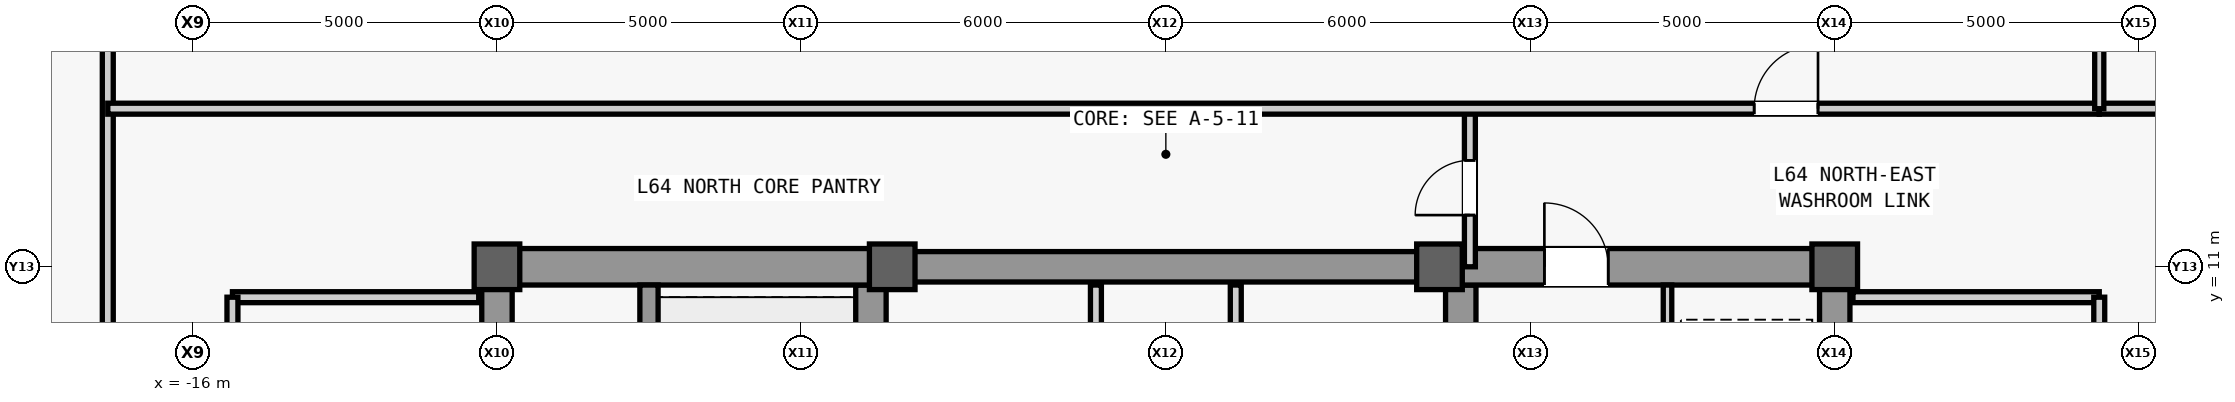
"""IFC4 building model, lengths in metres.
Left out: names, types, materials, properties, quantities, classifications, styles, units other than length and angle.
Written with IfcOpenShell. Run it as: python <this file> out.ifc"""

import sys

from ifc_helpers import new_model, si_unit, direction, frame, frame_2d, origin, origin_2d, place, context, subcontext, project, spatial, rectangle, extrude, source, transform, mapped, element, fill, save


model = new_model("IFC4")
c1 = context("Model", 3, precision=1e-05, world=origin(), true_north=direction((0.0, 1.0)))
c2 = subcontext(c1, "Body", "Model", "MODEL_VIEW")
j1 = project(units=[si_unit("LENGTHUNIT", "METRE"), si_unit("PLANEANGLEUNIT", "RADIAN")], contexts=[c1])
p1 = place(None, origin())
s1 = spatial("IfcSite", under=j1, at=p1, CompositionType="ELEMENT")
p2 = place(p1, origin())
s2 = spatial("IfcBuilding", under=s1, at=p2, CompositionType="ELEMENT")
p3 = place(p2, frame((0.0, 0.0, 273.5)))
s3 = spatial("IfcBuildingStorey", under=s2, at=p3, CompositionType="ELEMENT", Elevation=273.5)
m1 = source(origin(), c2, "Body", "SweptSolid", [
    extrude(rectangle(XDim=22.0, YDim=0.5, at=frame_2d((11.0, 0.0))), origin(), (0.0, 0.0, 1.0), 3.78),
])
p4 = place(p3, frame((-11.0, -11.0, 0.0), z_axis=(0.0, 0.0, 1.0), x_axis=(0.0, 1.0, 0.0)))
e1 = element("IfcWall", 1, at=p4, inside=s3, PredefinedType="SHEAR", context=c2, shape_type="MappedRepresentation", body=[
    mapped(m1, transform((0.0, 0.0, 0.0), scale=1.0)),
])
m2 = source(origin(), c2, "Body", "SweptSolid", [
    extrude(rectangle(XDim=1.1, YDim=2.2, at=frame_2d((0.55, 1.1))), frame((0.0, 0.26, 0.0), z_axis=(0.0, -1.0, 0.0), x_axis=(1.0, 0.0, 0.0)), (0.0, 0.0, 1.0), 0.52),
])
p5 = place(p4, frame((0.8, 0.0, 0.0)))
e2 = element("IfcOpeningElement", 2, at=p5, cuts=e1, PredefinedType="OPENING", context=c2, shape_type="MappedRepresentation", body=[
    mapped(m2, transform((0.0, 0.0, 0.0), scale=1.0)),
])
p6 = place(p4, frame((12.5, 0.0, 0.0)))
e3 = element("IfcOpeningElement", 3, at=p6, cuts=e1, PredefinedType="OPENING", context=c2, shape_type="MappedRepresentation", body=[
    mapped(m2, transform((0.0, 0.0, 0.0), scale=1.0)),
])
m3 = source(origin(), c2, "Body", "SweptSolid", [
    extrude(rectangle(XDim=0.9, YDim=2.15, at=frame_2d((0.45, 1.075))), frame((0.0, 0.26, 0.0), z_axis=(0.0, -1.0, 0.0), x_axis=(1.0, 0.0, 0.0)), (0.0, 0.0, 1.0), 0.52),
])
p7 = place(p4, frame((6.2, 0.0, 0.0)))
e4 = element("IfcOpeningElement", 4, at=p7, cuts=e1, PredefinedType="OPENING", context=c2, shape_type="MappedRepresentation", body=[
    mapped(m3, transform((0.0, 0.0, 0.0), scale=1.0)),
])
p8 = place(p4, frame((8.05, 0.0, 0.0)))
e5 = element("IfcOpeningElement", 5, at=p8, cuts=e1, PredefinedType="OPENING", context=c2, shape_type="MappedRepresentation", body=[
    mapped(m3, transform((0.0, 0.0, 0.0), scale=1.0)),
])
m4 = source(origin(), c2, "Body", "SweptSolid", [
    extrude(rectangle(XDim=1.2, YDim=2.3, at=frame_2d((0.6, 1.15))), frame((0.0, 0.26, 0.0), z_axis=(0.0, -1.0, 0.0), x_axis=(1.0, 0.0, 0.0)), (0.0, 0.0, 1.0), 0.52),
])
p9 = place(p4, frame((14.6, 0.0, 0.0)))
e6 = element("IfcOpeningElement", 6, at=p9, cuts=e1, PredefinedType="OPENING", context=c2, shape_type="MappedRepresentation", body=[
    mapped(m4, transform((0.0, 0.0, 0.0), scale=1.0)),
])
p10 = place(p4, frame((18.2, 0.0, 0.0)))
e7 = element("IfcOpeningElement", 7, at=p10, cuts=e1, PredefinedType="OPENING", context=c2, shape_type="MappedRepresentation", body=[
    mapped(m4, transform((0.0, 0.0, 0.0), scale=1.0)),
])
m5 = source(origin(), c2, "Body", "SweptSolid", [
    extrude(rectangle(XDim=1.3, YDim=2.3, at=frame_2d((0.65, 1.15))), frame((0.0, 0.26, 0.0), z_axis=(0.0, -1.0, 0.0), x_axis=(1.0, 0.0, 0.0)), (0.0, 0.0, 1.0), 0.52),
])
p11 = place(p4, frame((2.7, 0.0, 0.0)))
e8 = element("IfcOpeningElement", 8, at=p11, cuts=e1, PredefinedType="OPENING", context=c2, shape_type="MappedRepresentation", body=[
    mapped(m5, transform((0.0, 0.0, 0.0), scale=1.0)),
])
p12 = place(p3, frame((11.0, -11.0, 0.0), z_axis=(0.0, 0.0, 1.0), x_axis=(0.0, 1.0, 0.0)))
e9 = element("IfcWall", 9, at=p12, inside=s3, PredefinedType="SHEAR", context=c2, shape_type="MappedRepresentation", body=[
    mapped(m1, transform((0.0, 0.0, 0.0), scale=1.0)),
])
p13 = place(p12, frame((0.8, 0.0, 0.0)))
e10 = element("IfcOpeningElement", 10, at=p13, cuts=e9, PredefinedType="OPENING", context=c2, shape_type="MappedRepresentation", body=[
    mapped(m2, transform((0.0, 0.0, 0.0), scale=1.0)),
])
p14 = place(p12, frame((6.85, 0.0, 0.0)))
e11 = element("IfcOpeningElement", 11, at=p14, cuts=e9, PredefinedType="OPENING", context=c2, shape_type="MappedRepresentation", body=[
    mapped(m3, transform((0.0, 0.0, 0.0), scale=1.0)),
])
p15 = place(p12, frame((17.6, 0.0, 0.0)))
e12 = element("IfcOpeningElement", 12, at=p15, cuts=e9, PredefinedType="OPENING", context=c2, shape_type="MappedRepresentation", body=[
    mapped(m4, transform((0.0, 0.0, 0.0), scale=1.0)),
])
p16 = place(p12, frame((19.6, 0.0, 0.0)))
e13 = element("IfcOpeningElement", 13, at=p16, cuts=e9, PredefinedType="OPENING", context=c2, shape_type="MappedRepresentation", body=[
    mapped(m4, transform((0.0, 0.0, 0.0), scale=1.0)),
])
p17 = place(p12, frame((2.7, 0.0, 0.0)))
e14 = element("IfcOpeningElement", 14, at=p17, cuts=e9, PredefinedType="OPENING", context=c2, shape_type="MappedRepresentation", body=[
    mapped(m5, transform((0.0, 0.0, 0.0), scale=1.0)),
])
p18 = place(p12, frame((13.35, 0.0, 0.0)))
e15 = element("IfcOpeningElement", 15, at=p18, cuts=e9, PredefinedType="OPENING", context=c2, shape_type="MappedRepresentation", body=[
    mapped(m5, transform((0.0, 0.0, 0.0), scale=1.0)),
])
m6 = source(origin(), c2, "Body", "SweptSolid", [
    extrude(rectangle(XDim=21.4, YDim=0.5, at=frame_2d((10.7, 0.0))), origin(), (0.0, 0.0, 1.0), 3.78),
])
for number, where, z_axis, x_axis in (
    (16, (-4.85, -10.7, 0.0), (0.0, 0.0, 1.0), (0.0, 1.0, 0.0)),
    (17, (4.85, -10.7, 0.0), (0.0, 0.0, 1.0), (0.0, 1.0, 0.0)),
):
    element("IfcWall", number, at=place(p3, frame(where, z_axis=z_axis, x_axis=x_axis)), inside=s3, PredefinedType="SHEAR", context=c2, shape_type="MappedRepresentation", body=[
        mapped(m6, transform((0.0, 0.0, 0.0), scale=1.0)),
    ])
m7 = source(origin(), c2, "Body", "SweptSolid", [
    extrude(rectangle(XDim=5.9, YDim=0.6, at=frame_2d((2.95, 0.0))), origin(), (0.0, 0.0, 1.0), 3.78),
])
p19 = place(p3, frame((-10.75, 11.0, 0.0), z_axis=(0.0, 0.0, 1.0), x_axis=(1.0, 0.0, 0.0)))
e18 = element("IfcWall", 18, at=p19, inside=s3, PredefinedType="SHEAR", context=c2, shape_type="MappedRepresentation", body=[
    mapped(m7, transform((0.0, 0.0, 0.0), scale=1.0)),
])
p20 = place(p3, frame((4.85, 11.0, 0.0), z_axis=(0.0, 0.0, 1.0), x_axis=(1.0, 0.0, 0.0)))
e19 = element("IfcWall", 19, at=p20, inside=s3, PredefinedType="SHEAR", context=c2, shape_type="MappedRepresentation", body=[
    mapped(m7, transform((0.0, 0.0, 0.0), scale=1.0)),
])
m8 = source(origin(), c2, "Body", "SweptSolid", [
    extrude(rectangle(XDim=1.05, YDim=2.2, at=frame_2d((0.525, 1.1))), frame((0.0, 0.31, 0.0), z_axis=(0.0, -1.0, 0.0), x_axis=(1.0, 0.0, 0.0)), (0.0, 0.0, 1.0), 0.62),
])
p21 = place(p20, frame((1.375, 0.0, 0.0)))
e20 = element("IfcOpeningElement", 20, at=p21, cuts=e19, PredefinedType="OPENING", context=c2, shape_type="MappedRepresentation", body=[
    mapped(m8, transform((0.0, 0.0, 0.0), scale=1.0)),
])
m9 = source(origin(), c2, "Body", "SweptSolid", [
    extrude(rectangle(XDim=9.2, YDim=0.5, at=frame_2d((4.6, 0.0))), origin(), (0.0, 0.0, 1.0), 3.78),
])
p22 = place(p3, frame((-4.6, 11.0, 0.0), z_axis=(0.0, 0.0, 1.0), x_axis=(1.0, 0.0, 0.0)))
e21 = element("IfcWall", 21, at=p22, inside=s3, PredefinedType="SHEAR", context=c2, shape_type="MappedRepresentation", body=[
    mapped(m9, transform((0.0, 0.0, 0.0), scale=1.0)),
])
m10 = source(origin(), c2, "Body", "SweptSolid", [
    extrude(rectangle(XDim=0.75, YDim=0.75, at=origin_2d()), origin(), (0.0, 0.0, 1.0), 4.0),
])
for number, where, z_axis, x_axis in (
    (22, (-11.0, 11.0, 0.0), (0.0, 0.0, 1.0), (1.0, 0.0, 0.0)),
    (23, (-4.5, 11.0, 0.0), (0.0, 0.0, 1.0), (1.0, 0.0, 0.0)),
    (24, (4.5, 11.0, 0.0), (0.0, 0.0, 1.0), (1.0, 0.0, 0.0)),
    (25, (11.0, 11.0, 0.0), (0.0, 0.0, 1.0), (1.0, 0.0, 0.0)),
):
    element("IfcColumn", number, at=place(p3, frame(where, z_axis=z_axis, x_axis=x_axis)), inside=s3, PredefinedType="COLUMN", context=c2, shape_type="MappedRepresentation", body=[
        mapped(m10, transform((0.0, 0.0, 0.0), scale=1.0)),
    ])
m11 = source(origin(), c2, "Body", "SweptSolid", [
    extrude(rectangle(XDim=7.75, YDim=0.3, at=frame_2d((3.875, 0.0))), origin(), (0.0, 0.0, 1.0), 3.78),
])
p23 = place(p3, frame((-8.5, 2.95, 0.0), z_axis=(0.0, 0.0, 1.0), x_axis=(0.0, 1.0, 0.0)))
e26 = element("IfcWall", 26, at=p23, inside=s3, PredefinedType="SHEAR", context=c2, shape_type="MappedRepresentation", body=[
    mapped(m11, transform((0.0, 0.0, 0.0), scale=1.0)),
])
m12 = source(origin(), c2, "Body", "SweptSolid", [
    extrude(rectangle(XDim=9.4, YDim=0.14, at=frame_2d((4.7, 0.0))), origin(), (0.0, 0.0, 1.0), 3.78),
])
p24 = place(p3, frame((8.25, 1.3, 0.0), z_axis=(0.0, 0.0, 1.0), x_axis=(0.0, 1.0, 0.0)))
e27 = element("IfcWall", 27, at=p24, inside=s3, PredefinedType="PARTITIONING", context=c2, shape_type="MappedRepresentation", body=[
    mapped(m12, transform((0.0, 0.0, 0.0), scale=1.0)),
])
m13 = source(origin(), c2, "Body", "SweptSolid", [
    extrude(rectangle(XDim=4.05, YDim=0.18, at=frame_2d((2.025, 0.0))), origin(), (0.0, 0.0, 1.0), 3.78),
])
p25 = place(p3, frame((-15.35, 10.5, 0.0), z_axis=(0.0, 0.0, 1.0), x_axis=(1.0, 0.0, 0.0)))
e28 = element("IfcWall", 28, at=p25, inside=s3, PredefinedType="PARTITIONING", context=c2, shape_type="MappedRepresentation", body=[
    mapped(m13, transform((0.0, 0.0, 0.0), scale=1.0)),
])
m14 = source(origin(), c2, "Body", "SweptSolid", [
    extrude(rectangle(XDim=16.6, YDim=0.18, at=frame_2d((8.3, 0.0))), origin(), (0.0, 0.0, 1.0), 3.78),
])
p26 = place(p3, frame((-15.35, -6.1, 0.0), z_axis=(0.0, 0.0, 1.0), x_axis=(0.0, 1.0, 0.0)))
e29 = element("IfcWall", 29, at=p26, inside=s3, PredefinedType="PARTITIONING", context=c2, shape_type="MappedRepresentation", body=[
    mapped(m14, transform((0.0, 0.0, 0.0), scale=1.0)),
])
m15 = source(origin(), c2, "Body", "SweptSolid", [
    extrude(rectangle(XDim=1.8, YDim=2.25, at=frame_2d((0.9, 1.125))), frame((0.0, 0.1, 0.0), z_axis=(0.0, -1.0, 0.0), x_axis=(1.0, 0.0, 0.0)), (0.0, 0.0, 1.0), 0.2),
])
p27 = place(p26, frame((2.7, 0.0, 0.0)))
e30 = element("IfcOpeningElement", 30, at=p27, cuts=e29, PredefinedType="OPENING", context=c2, shape_type="MappedRepresentation", body=[
    mapped(m15, transform((0.0, 0.0, 0.0), scale=1.0)),
])
p28 = place(p26, frame((11.0, 0.0, 0.0)))
e31 = element("IfcOpeningElement", 31, at=p28, cuts=e29, PredefinedType="OPENING", context=c2, shape_type="MappedRepresentation", body=[
    mapped(m15, transform((0.0, 0.0, 0.0), scale=1.0)),
])
p29 = place(p3, frame((11.3, 10.5, 0.0), z_axis=(0.0, 0.0, 1.0), x_axis=(1.0, 0.0, 0.0)))
e32 = element("IfcWall", 32, at=p29, inside=s3, PredefinedType="PARTITIONING", context=c2, shape_type="MappedRepresentation", body=[
    mapped(m13, transform((0.0, 0.0, 0.0), scale=1.0)),
])
p30 = place(p3, frame((15.35, -6.1, 0.0), z_axis=(0.0, 0.0, 1.0), x_axis=(0.0, 1.0, 0.0)))
e33 = element("IfcWall", 33, at=p30, inside=s3, PredefinedType="PARTITIONING", context=c2, shape_type="MappedRepresentation", body=[
    mapped(m14, transform((0.0, 0.0, 0.0), scale=1.0)),
])
p31 = place(p30, frame((2.7, 0.0, 0.0)))
e34 = element("IfcOpeningElement", 34, at=p31, cuts=e33, PredefinedType="OPENING", context=c2, shape_type="MappedRepresentation", body=[
    mapped(m15, transform((0.0, 0.0, 0.0), scale=1.0)),
])
p32 = place(p30, frame((13.0, 0.0, 0.0)))
e35 = element("IfcOpeningElement", 35, at=p32, cuts=e33, PredefinedType="OPENING", context=c2, shape_type="MappedRepresentation", body=[
    mapped(m15, transform((0.0, 0.0, 0.0), scale=1.0)),
])
m16 = source(origin(), c2, "Body", "SweptSolid", [
    extrude(rectangle(XDim=5.4, YDim=0.18, at=frame_2d((2.7, 0.0))), origin(), (0.0, 0.0, 1.0), 3.78),
])
p33 = place(p3, frame((-1.15, 5.3, 0.0), z_axis=(0.0, 0.0, 1.0), x_axis=(0.0, 1.0, 0.0)))
e36 = element("IfcWall", 36, at=p33, inside=s3, PredefinedType="PARTITIONING", context=c2, shape_type="MappedRepresentation", body=[
    mapped(m16, transform((0.0, 0.0, 0.0), scale=1.0)),
])
m17 = source(origin(), c2, "Body", "SweptSolid", [
    extrude(rectangle(XDim=0.9, YDim=2.15, at=frame_2d((0.45, 1.075))), frame((0.0, 0.1, 0.0), z_axis=(0.0, -1.0, 0.0), x_axis=(1.0, 0.0, 0.0)), (0.0, 0.0, 1.0), 0.2),
])
p34 = place(p33, frame((0.9, 0.0, 0.0)))
e37 = element("IfcOpeningElement", 37, at=p34, cuts=e36, PredefinedType="OPENING", context=c2, shape_type="MappedRepresentation", body=[
    mapped(m17, transform((0.0, 0.0, 0.0), scale=1.0)),
])
p35 = place(p33, frame((3.6, 0.0, 0.0)))
e38 = element("IfcOpeningElement", 38, at=p35, cuts=e36, PredefinedType="OPENING", context=c2, shape_type="MappedRepresentation", body=[
    mapped(m17, transform((0.0, 0.0, 0.0), scale=1.0)),
])
p36 = place(p3, frame((1.15, 5.3, 0.0), z_axis=(0.0, 0.0, 1.0), x_axis=(0.0, 1.0, 0.0)))
e39 = element("IfcWall", 39, at=p36, inside=s3, PredefinedType="PARTITIONING", context=c2, shape_type="MappedRepresentation", body=[
    mapped(m16, transform((0.0, 0.0, 0.0), scale=1.0)),
])
p37 = place(p36, frame((2.25, 0.0, 0.0)))
e40 = element("IfcOpeningElement", 40, at=p37, cuts=e39, PredefinedType="OPENING", context=c2, shape_type="MappedRepresentation", body=[
    mapped(m17, transform((0.0, 0.0, 0.0), scale=1.0)),
])
m18 = source(origin(), c2, "Body", "SweptSolid", [
    extrude(rectangle(XDim=8.4, YDim=0.18, at=frame_2d((4.2, 0.0))), origin(), (0.0, 0.0, 1.0), 3.78),
])
p38 = place(p3, frame((-17.4, 7.2, 0.0), z_axis=(0.0, 0.0, 1.0), x_axis=(0.0, 1.0, 0.0)))
e41 = element("IfcWall", 41, at=p38, inside=s3, PredefinedType="PARTITIONING", context=c2, shape_type="MappedRepresentation", body=[
    mapped(m18, transform((0.0, 0.0, 0.0), scale=1.0)),
])
m19 = source(origin(), c2, "Body", "SweptSolid", [
    extrude(rectangle(XDim=2.6, YDim=0.18, at=frame_2d((1.3, 0.0))), origin(), (0.0, 0.0, 1.0), 3.78),
])
p39 = place(p3, frame((5.0, 11.0, 0.0), z_axis=(0.0, 0.0, 1.0), x_axis=(0.0, 1.0, 0.0)))
e42 = element("IfcWall", 42, at=p39, inside=s3, PredefinedType="PARTITIONING", context=c2, shape_type="MappedRepresentation", body=[
    mapped(m19, transform((0.0, 0.0, 0.0), scale=1.0)),
])
p40 = place(p39, frame((0.85, 0.0, 0.0)))
e43 = element("IfcOpeningElement", 43, at=p40, cuts=e42, PredefinedType="OPENING", context=c2, shape_type="MappedRepresentation", body=[
    mapped(m17, transform((0.0, 0.0, 0.0), scale=1.0)),
])
m20 = source(origin(), c2, "Body", "SweptSolid", [
    extrude(rectangle(XDim=2.4, YDim=0.18, at=frame_2d((1.2, 0.0))), origin(), (0.0, 0.0, 1.0), 3.78),
])
p41 = place(p3, frame((15.35, 13.6, 0.0), z_axis=(0.0, 0.0, 1.0), x_axis=(1.0, 0.0, 0.0)))
e44 = element("IfcWall", 44, at=p41, inside=s3, PredefinedType="PARTITIONING", context=c2, shape_type="MappedRepresentation", body=[
    mapped(m20, transform((0.0, 0.0, 0.0), scale=1.0)),
])
m21 = source(origin(), c2, "Body", "SweptSolid", [
    extrude(rectangle(XDim=32.75, YDim=0.18, at=frame_2d((16.375, 0.0))), origin(), (0.0, 0.0, 1.0), 3.78),
])
p42 = place(p3, frame((-17.4, 13.6, 0.0), z_axis=(0.0, 0.0, 1.0), x_axis=(1.0, 0.0, 0.0)))
e45 = element("IfcWall", 45, at=p42, inside=s3, PredefinedType="PARTITIONING", context=c2, shape_type="MappedRepresentation", body=[
    mapped(m21, transform((0.0, 0.0, 0.0), scale=1.0)),
])
m22 = source(origin(), c2, "Body", "SweptSolid", [
    extrude(rectangle(XDim=1.05, YDim=2.2, at=frame_2d((0.525, 1.1))), frame((0.0, 0.1, 0.0), z_axis=(0.0, -1.0, 0.0), x_axis=(1.0, 0.0, 0.0)), (0.0, 0.0, 1.0), 0.2),
])
p43 = place(p42, frame((27.075, 0.0, 0.0)))
e46 = element("IfcOpeningElement", 46, at=p43, cuts=e45, PredefinedType="OPENING", context=c2, shape_type="MappedRepresentation", body=[
    mapped(m22, transform((0.0, 0.0, 0.0), scale=1.0)),
])
m23 = source(origin(), c2, "Body", "SweptSolid", [
    extrude(rectangle(XDim=14.4, YDim=0.15, at=frame_2d((7.2, 0.0))), origin(), (0.0, 0.0, 1.0), 3.78),
])
p44 = place(p3, frame((15.35, 13.6, 0.0), z_axis=(0.0, 0.0, 1.0), x_axis=(0.0, 1.0, 0.0)))
e47 = element("IfcWall", 47, at=p44, inside=s3, PredefinedType="PARTITIONING", context=c2, shape_type="MappedRepresentation", body=[
    mapped(m23, transform((0.0, 0.0, 0.0), scale=1.0)),
])
m24 = source(origin(), c2, "Body", "SweptSolid", [
    extrude(rectangle(XDim=1.05, YDim=2.2, at=frame_2d((0.525, 1.1))), frame((0.0, 0.025, 0.0), z_axis=(0.0, -1.0, 0.0), x_axis=(1.0, 0.0, 0.0)), (0.0, 0.0, 1.0), 0.05),
])
p45 = place(p21, origin())
e48 = element("IfcDoor", 48, at=p45, inside=s3, OperationType="SINGLE_SWING_LEFT", PredefinedType="DOOR", context=c2, shape_type="MappedRepresentation", body=[
    mapped(m24, transform((0.0, 0.0, 0.0), scale=1.0)),
])
fill(e20, e48)
m25 = source(origin(), c2, "Body", "SweptSolid", [
    extrude(rectangle(XDim=0.9, YDim=2.15, at=frame_2d((0.45, 1.075))), frame((0.0, 0.025, 0.0), z_axis=(0.0, -1.0, 0.0), x_axis=(1.0, 0.0, 0.0)), (0.0, 0.0, 1.0), 0.05),
])
p46 = place(p40, origin())
e49 = element("IfcDoor", 49, at=p46, inside=s3, OperationType="SINGLE_SWING_LEFT", PredefinedType="DOOR", context=c2, shape_type="MappedRepresentation", body=[
    mapped(m25, transform((0.0, 0.0, 0.0), scale=1.0)),
])
fill(e43, e49)
p47 = place(p43, origin())
e50 = element("IfcDoor", 50, at=p47, inside=s3, OperationType="SINGLE_SWING_RIGHT", PredefinedType="DOOR", context=c2, shape_type="MappedRepresentation", body=[
    mapped(m24, transform((0.0, 0.0, 0.0), scale=1.0)),
])
fill(e46, e50)
save(model, sys.argv[1])
